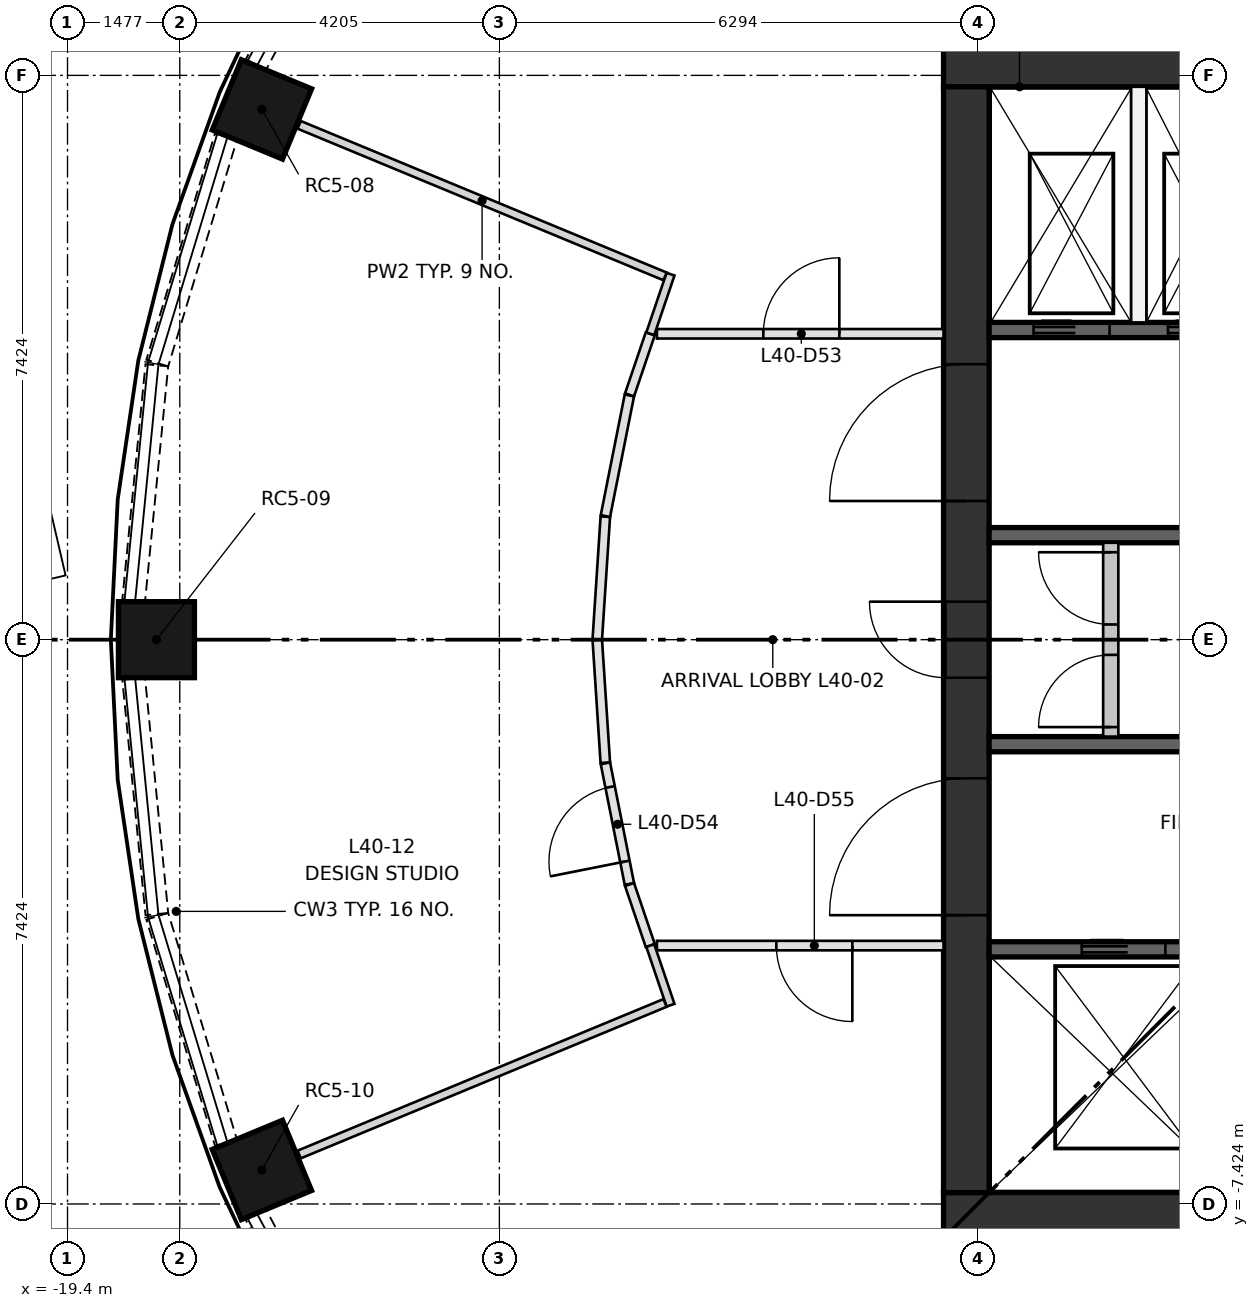
"""IFC4 building model, lengths in metres.
Left out: names, types, materials, properties, quantities, classifications, styles, units other than length and angle.
Written with IfcOpenShell. Run it as: python <this file> out.ifc"""

import sys

from ifc_helpers import new_model, si_unit, direction, frame, frame_2d, origin, origin_2d, place, context, subcontext, project, spatial, rectangle, extrude, element, fill, save


model = new_model("IFC4")
c1 = context("Model", 3, precision=1e-05, world=origin(), true_north=direction((0.0, 1.0)))
c2 = subcontext(c1, "Body", "Model", "MODEL_VIEW")
j1 = project(units=[si_unit("LENGTHUNIT", "METRE"), si_unit("PLANEANGLEUNIT", "RADIAN")], contexts=[c1])
p1 = place(None, origin())
s1 = spatial("IfcSite", under=j1, at=p1, CompositionType="ELEMENT")
p2 = place(p1, origin())
s2 = spatial("IfcBuilding", under=s1, at=p2, CompositionType="ELEMENT")
p3 = place(p2, frame((0.0, 0.0, 151.1)))
s3 = spatial("IfcBuildingStorey", under=s2, at=p3, CompositionType="ELEMENT", Elevation=151.1)
for number, where, z_axis, x_axis in (
    (1, (-16.842, 6.976, 0.0), (0.0, 0.0, 1.0), (-0.924, 0.383, 0.0)),
    (2, (-18.23, 0.0, 0.0), (0.0, 0.0, 1.0), (-1.0, 0.0, 0.0)),
    (3, (-16.842, -6.976, 0.0), (0.0, 0.0, 1.0), (-0.924, -0.383, 0.0)),
):
    element("IfcColumn", number, at=place(p3, frame(where, z_axis=z_axis, x_axis=x_axis)), inside=s3, PredefinedType="COLUMN", context=c2, shape_type="SweptSolid", body=[
        extrude(rectangle(XDim=1.0, YDim=1.0, at=origin_2d()), origin(), (0.0, 0.0, 1.0), 3.35),
    ])
for number, where, z_axis, x_axis in (
    (4, (-7.874, -7.574, 0.0), (0.0, 0.0, 1.0), (1.0, 0.0, 0.0)),
    (5, (-7.874, 7.574, 0.0), (0.0, 0.0, 1.0), (1.0, 0.0, 0.0)),
):
    element("IfcWall", number, at=place(p3, frame(where, z_axis=z_axis, x_axis=x_axis)), inside=s3, PredefinedType="SHEAR", context=c2, shape_type="SweptSolid", body=[
        extrude(rectangle(XDim=15.748, YDim=0.6, at=frame_2d((7.874, 0.0))), origin(), (0.0, 0.0, 1.0), 3.35),
    ])
p4 = place(p3, frame((-7.574, -7.274, 0.0), z_axis=(0.0, 0.0, 1.0), x_axis=(0.0, 1.0, 0.0)))
e6 = element("IfcWall", 6, at=p4, inside=s3, PredefinedType="SHEAR", context=c2, shape_type="SweptSolid", body=[
    extrude(rectangle(XDim=14.548, YDim=0.6, at=frame_2d((7.274, 0.0))), origin(), (0.0, 0.0, 1.0), 3.35),
])
p5 = place(p4, frame((6.774, 0.0, 0.0)))
e7 = element("IfcOpeningElement", 7, at=p5, cuts=e6, PredefinedType="OPENING", context=c2, shape_type="SweptSolid", body=[
    extrude(rectangle(XDim=1.0, YDim=2.1, at=frame_2d((0.5, 1.05))), frame((0.0, 0.31, 0.0), z_axis=(0.0, -1.0, 0.0), x_axis=(1.0, 0.0, 0.0)), (0.0, 0.0, 1.0), 0.62),
])
p6 = place(p4, frame((3.649, 0.0, 0.0)))
e8 = element("IfcOpeningElement", 8, at=p6, cuts=e6, PredefinedType="OPENING", context=c2, shape_type="SweptSolid", body=[
    extrude(rectangle(XDim=1.8, YDim=2.1, at=frame_2d((0.9, 1.05))), frame((0.0, 0.31, 0.0), z_axis=(0.0, -1.0, 0.0), x_axis=(1.0, 0.0, 0.0)), (0.0, 0.0, 1.0), 0.62),
])
p7 = place(p4, frame((9.098, 0.0, 0.0)))
e9 = element("IfcOpeningElement", 9, at=p7, cuts=e6, PredefinedType="OPENING", context=c2, shape_type="SweptSolid", body=[
    extrude(rectangle(XDim=1.8, YDim=2.1, at=frame_2d((0.9, 1.05))), frame((0.0, 0.31, 0.0), z_axis=(0.0, -1.0, 0.0), x_axis=(1.0, 0.0, 0.0)), (0.0, 0.0, 1.0), 0.62),
])
p8 = place(p3, frame((-7.274, -4.074, 0.0), z_axis=(0.0, 0.0, 1.0), x_axis=(1.0, 0.0, 0.0)))
e10 = element("IfcWall", 10, at=p8, inside=s3, PredefinedType="SHEAR", context=c2, shape_type="SweptSolid", body=[
    extrude(rectangle(XDim=14.548, YDim=0.2, at=frame_2d((7.274, 0.0))), origin(), (0.0, 0.0, 1.0), 3.0),
])
p9 = place(p8, frame((1.219, 0.0, 0.0)))
e11 = element("IfcOpeningElement", 11, at=p9, cuts=e10, PredefinedType="OPENING", context=c2, shape_type="SweptSolid", body=[
    extrude(rectangle(XDim=1.1, YDim=2.1, at=frame_2d((0.55, 1.05))), frame((0.0, 0.11, 0.0), z_axis=(0.0, -1.0, 0.0), x_axis=(1.0, 0.0, 0.0)), (0.0, 0.0, 1.0), 0.22),
])
p10 = place(p8, frame((4.355, 0.0, 0.0)))
e12 = element("IfcOpeningElement", 12, at=p10, cuts=e10, PredefinedType="OPENING", context=c2, shape_type="SweptSolid", body=[
    extrude(rectangle(XDim=1.1, YDim=2.1, at=frame_2d((0.55, 1.05))), frame((0.0, 0.11, 0.0), z_axis=(0.0, -1.0, 0.0), x_axis=(1.0, 0.0, 0.0)), (0.0, 0.0, 1.0), 0.22),
])
p11 = place(p8, frame((7.047, 0.0, 0.0)))
e13 = element("IfcOpeningElement", 13, at=p11, cuts=e10, PredefinedType="OPENING", context=c2, shape_type="SweptSolid", body=[
    extrude(rectangle(XDim=0.8, YDim=2.1, at=frame_2d((0.4, 1.05))), frame((0.0, 0.11, 0.0), z_axis=(0.0, -1.0, 0.0), x_axis=(1.0, 0.0, 0.0)), (0.0, 0.0, 1.0), 0.22),
])
p12 = place(p8, frame((9.185, 0.0, 0.0)))
e14 = element("IfcOpeningElement", 14, at=p12, cuts=e10, PredefinedType="OPENING", context=c2, shape_type="SweptSolid", body=[
    extrude(rectangle(XDim=1.0, YDim=2.1, at=frame_2d((0.5, 1.05))), frame((0.0, 0.11, 0.0), z_axis=(0.0, -1.0, 0.0), x_axis=(1.0, 0.0, 0.0)), (0.0, 0.0, 1.0), 0.22),
])
p13 = place(p8, frame((11.228, 0.0, 0.0)))
e15 = element("IfcOpeningElement", 15, at=p13, cuts=e10, PredefinedType="OPENING", context=c2, shape_type="SweptSolid", body=[
    extrude(rectangle(XDim=1.0, YDim=2.1, at=frame_2d((0.5, 1.05))), frame((0.0, 0.11, 0.0), z_axis=(0.0, -1.0, 0.0), x_axis=(1.0, 0.0, 0.0)), (0.0, 0.0, 1.0), 0.22),
])
p14 = place(p8, frame((13.078, 0.0, 0.0)))
e16 = element("IfcOpeningElement", 16, at=p14, cuts=e10, PredefinedType="OPENING", context=c2, shape_type="SweptSolid", body=[
    extrude(rectangle(XDim=1.0, YDim=2.1, at=frame_2d((0.5, 1.05))), frame((0.0, 0.11, 0.0), z_axis=(0.0, -1.0, 0.0), x_axis=(1.0, 0.0, 0.0)), (0.0, 0.0, 1.0), 0.22),
])
p15 = place(p3, frame((-7.274, 4.074, 0.0), z_axis=(0.0, 0.0, 1.0), x_axis=(1.0, 0.0, 0.0)))
e17 = element("IfcWall", 17, at=p15, inside=s3, PredefinedType="SHEAR", context=c2, shape_type="SweptSolid", body=[
    extrude(rectangle(XDim=7.274, YDim=0.2, at=frame_2d((3.637, 0.0))), origin(), (0.0, 0.0, 1.0), 3.0),
])
p16 = place(p15, frame((0.584, 0.0, 0.0)))
e18 = element("IfcOpeningElement", 18, at=p16, cuts=e17, PredefinedType="OPENING", context=c2, shape_type="SweptSolid", body=[
    extrude(rectangle(XDim=1.0, YDim=2.1, at=frame_2d((0.5, 1.05))), frame((0.0, 0.11, 0.0), z_axis=(0.0, -1.0, 0.0), x_axis=(1.0, 0.0, 0.0)), (0.0, 0.0, 1.0), 0.22),
])
p17 = place(p15, frame((2.353, 0.0, 0.0)))
e19 = element("IfcOpeningElement", 19, at=p17, cuts=e17, PredefinedType="OPENING", context=c2, shape_type="SweptSolid", body=[
    extrude(rectangle(XDim=1.0, YDim=2.1, at=frame_2d((0.5, 1.05))), frame((0.0, 0.11, 0.0), z_axis=(0.0, -1.0, 0.0), x_axis=(1.0, 0.0, 0.0)), (0.0, 0.0, 1.0), 0.22),
])
p18 = place(p15, frame((4.121, 0.0, 0.0)))
e20 = element("IfcOpeningElement", 20, at=p18, cuts=e17, PredefinedType="OPENING", context=c2, shape_type="SweptSolid", body=[
    extrude(rectangle(XDim=1.0, YDim=2.1, at=frame_2d((0.5, 1.05))), frame((0.0, 0.11, 0.0), z_axis=(0.0, -1.0, 0.0), x_axis=(1.0, 0.0, 0.0)), (0.0, 0.0, 1.0), 0.22),
])
p19 = place(p15, frame((5.89, 0.0, 0.0)))
e21 = element("IfcOpeningElement", 21, at=p19, cuts=e17, PredefinedType="OPENING", context=c2, shape_type="SweptSolid", body=[
    extrude(rectangle(XDim=1.0, YDim=2.1, at=frame_2d((0.5, 1.05))), frame((0.0, 0.11, 0.0), z_axis=(0.0, -1.0, 0.0), x_axis=(1.0, 0.0, 0.0)), (0.0, 0.0, 1.0), 0.22),
])
for number, where, z_axis, x_axis in (
    (22, (-7.274, -1.375, 0.0), (0.0, 0.0, 1.0), (1.0, 0.0, 0.0)),
    (23, (-7.274, 1.375, 0.0), (0.0, 0.0, 1.0), (1.0, 0.0, 0.0)),
):
    element("IfcWall", number, at=place(p3, frame(where, z_axis=z_axis, x_axis=x_axis)), inside=s3, PredefinedType="SHEAR", context=c2, shape_type="SweptSolid", body=[
        extrude(rectangle(XDim=2.9, YDim=0.2, at=frame_2d((1.45, 0.0))), origin(), (0.0, 0.0, 1.0), 3.0),
    ])
p20 = place(p3, frame((-5.305, 4.174, 0.0), z_axis=(0.0, 0.0, 1.0), x_axis=(0.0, 1.0, 0.0)))
e24 = element("IfcWall", 24, at=p20, inside=s3, PredefinedType="PARTITIONING", context=c2, shape_type="SweptSolid", body=[
    extrude(rectangle(XDim=3.1, YDim=0.2, at=frame_2d((1.55, 0.0))), origin(), (0.0, 0.0, 1.0), 3.0),
])
p21 = place(p3, frame((-5.674, -1.275, 0.0), z_axis=(0.0, 0.0, 1.0), x_axis=(0.0, 1.0, 0.0)))
e25 = element("IfcWall", 25, at=p21, inside=s3, PredefinedType="PARTITIONING", context=c2, shape_type="SweptSolid", body=[
    extrude(rectangle(XDim=2.55, YDim=0.2, at=frame_2d((1.275, 0.0))), origin(), (0.0, 0.0, 1.0), 3.0),
])
p22 = place(p21, frame((0.125, 0.0, 0.0)))
e26 = element("IfcOpeningElement", 26, at=p22, cuts=e25, PredefinedType="OPENING", context=c2, shape_type="SweptSolid", body=[
    extrude(rectangle(XDim=0.95, YDim=2.1, at=frame_2d((0.475, 1.05))), frame((0.0, 0.11, 0.0), z_axis=(0.0, -1.0, 0.0), x_axis=(1.0, 0.0, 0.0)), (0.0, 0.0, 1.0), 0.22),
])
p23 = place(p21, frame((1.475, 0.0, 0.0)))
e27 = element("IfcOpeningElement", 27, at=p23, cuts=e25, PredefinedType="OPENING", context=c2, shape_type="SweptSolid", body=[
    extrude(rectangle(XDim=0.95, YDim=2.1, at=frame_2d((0.475, 1.05))), frame((0.0, 0.11, 0.0), z_axis=(0.0, -1.0, 0.0), x_axis=(1.0, 0.0, 0.0)), (0.0, 0.0, 1.0), 0.22),
])
p24 = place(p3, frame((-15.455, 10.309, 0.0), z_axis=(0.0, 0.0, 1.0), x_axis=(-0.471467771589, -0.881883291798, 0.0)))
e28 = element("IfcWall", 28, at=p24, inside=s3, PredefinedType="SOLIDWALL", context=c2, shape_type="SweptSolid", body=[
    extrude(rectangle(XDim=3.111, YDim=0.3, at=frame_2d((1.556, 0.0))), origin(), (0.0, 0.0, 1.0), 0.9),
])
p25 = place(p3, frame((-17.315, 6.617, 0.0), z_axis=(0.0, 0.0, 1.0), x_axis=(-0.29026219948, -0.956947154002, 0.0)))
e29 = element("IfcWall", 29, at=p25, inside=s3, PredefinedType="SOLIDWALL", context=c2, shape_type="SweptSolid", body=[
    extrude(rectangle(XDim=3.111, YDim=0.3, at=frame_2d((1.556, 0.0))), origin(), (0.0, 0.0, 1.0), 0.9),
])
for number, where, z_axis, x_axis in (
    (30, (-18.225, 3.61, 0.0), (0.0, 0.0, 1.0), (-0.098, -0.995, 0.0)),
    (31, (-18.53, -0.514, 0.0), (0.0, 0.0, 1.0), (0.098, -0.995, 0.0)),
):
    element("IfcWall", number, at=place(p3, frame(where, z_axis=z_axis, x_axis=x_axis)), inside=s3, PredefinedType="SOLIDWALL", context=c2, shape_type="SweptSolid", body=[
        extrude(rectangle(XDim=3.111, YDim=0.3, at=frame_2d((1.556, 0.0))), origin(), (0.0, 0.0, 1.0), 0.9),
    ])
p26 = place(p3, frame((-18.219, -3.639, 0.0), z_axis=(0.0, 0.0, 1.0), x_axis=(0.29026219948, -0.956947154002, 0.0)))
e32 = element("IfcWall", 32, at=p26, inside=s3, PredefinedType="SOLIDWALL", context=c2, shape_type="SweptSolid", body=[
    extrude(rectangle(XDim=3.111, YDim=0.3, at=frame_2d((1.556, 0.0))), origin(), (0.0, 0.0, 1.0), 0.9),
])
p27 = place(p3, frame((-16.922, -7.565, 0.0), z_axis=(0.0, 0.0, 1.0), x_axis=(0.471467771589, -0.881883291798, 0.0)))
e33 = element("IfcWall", 33, at=p27, inside=s3, PredefinedType="SOLIDWALL", context=c2, shape_type="SweptSolid", body=[
    extrude(rectangle(XDim=3.111, YDim=0.3, at=frame_2d((1.556, 0.0))), origin(), (0.0, 0.0, 1.0), 0.9),
])
p28 = place(p3, frame((-11.645, 4.024, 0.0), z_axis=(0.0, 0.0, 1.0), x_axis=(1.0, 0.0, 0.0)))
e34 = element("IfcWall", 34, at=p28, inside=s3, PredefinedType="PARTITIONING", context=c2, shape_type="SweptSolid", body=[
    extrude(rectangle(XDim=3.771, YDim=0.125, at=frame_2d((1.886, 0.0))), origin(), (0.0, 0.0, 1.0), 3.0),
])
p29 = place(p28, frame((1.4, 0.0, 0.0)))
e35 = element("IfcOpeningElement", 35, at=p29, cuts=e34, PredefinedType="OPENING", context=c2, shape_type="SweptSolid", body=[
    extrude(rectangle(XDim=1.0, YDim=2.1, at=frame_2d((0.5, 1.05))), frame((0.0, 0.073, 0.0), z_axis=(0.0, -1.0, 0.0), x_axis=(1.0, 0.0, 0.0)), (0.0, 0.0, 1.0), 0.145),
])
for number, where, z_axis, x_axis in (
    (36, (-12.43, 0.004, 0.0), (0.0, 0.0, 1.0), (0.065, 0.998, 0.0)),
    (37, (-12.324, -1.618, 0.0), (0.0, 0.0, 1.0), (-0.065, 0.998, 0.0)),
    (38, (-12.323, 1.626, 0.0), (0.0, 0.0, 1.0), (0.195, 0.981, 0.0)),
):
    element("IfcWall", number, at=place(p3, frame(where, z_axis=z_axis, x_axis=x_axis)), inside=s3, PredefinedType="PARTITIONING", context=c2, shape_type="SweptSolid", body=[
        extrude(rectangle(XDim=1.618, YDim=0.125, at=frame_2d((0.809, 0.0))), origin(), (0.0, 0.0, 1.0), 3.0),
    ])
p30 = place(p3, frame((-12.007, -3.213, 0.0), z_axis=(0.0, 0.0, 1.0), x_axis=(-0.195129303098, 0.980777525779, 0.0)))
e39 = element("IfcWall", 39, at=p30, inside=s3, PredefinedType="PARTITIONING", context=c2, shape_type="SweptSolid", body=[
    extrude(rectangle(XDim=1.618, YDim=0.125, at=frame_2d((0.809, 0.0))), origin(), (0.0, 0.0, 1.0), 3.0),
])
p31 = place(p30, frame((0.3, 0.0, 0.0)))
e40 = element("IfcOpeningElement", 40, at=p31, cuts=e39, PredefinedType="OPENING", context=c2, shape_type="SweptSolid", body=[
    extrude(rectangle(XDim=1.0, YDim=2.1, at=frame_2d((0.5, 1.05))), frame((0.0, 0.073, 0.0), z_axis=(0.0, -1.0, 0.0), x_axis=(1.0, 0.0, 0.0)), (0.0, 0.0, 1.0), 0.145),
])
for number, where, z_axis, x_axis in (
    (41, (-12.005, 3.221, 0.0), (0.0, 0.0, 1.0), (0.321, 0.947, 0.0)),
    (42, (-11.732, -4.024, 0.0), (0.0, 0.0, 1.0), (-0.321, 0.947, 0.0)),
):
    element("IfcWall", number, at=place(p3, frame(where, z_axis=z_axis, x_axis=x_axis)), inside=s3, PredefinedType="PARTITIONING", context=c2, shape_type="SweptSolid", body=[
        extrude(rectangle(XDim=0.848, YDim=0.125, at=frame_2d((0.424, 0.0))), origin(), (0.0, 0.0, 1.0), 3.0),
    ])
p32 = place(p3, frame((-7.874, -4.024, 0.0), z_axis=(0.0, 0.0, 1.0), x_axis=(-1.0, 0.0, 0.0)))
e43 = element("IfcWall", 43, at=p32, inside=s3, PredefinedType="PARTITIONING", context=c2, shape_type="SweptSolid", body=[
    extrude(rectangle(XDim=3.771, YDim=0.125, at=frame_2d((1.886, 0.0))), origin(), (0.0, 0.0, 1.0), 3.0),
])
p33 = place(p32, frame((1.2, 0.0, 0.0)))
e44 = element("IfcOpeningElement", 44, at=p33, cuts=e43, PredefinedType="OPENING", context=c2, shape_type="SweptSolid", body=[
    extrude(rectangle(XDim=1.0, YDim=2.1, at=frame_2d((0.5, 1.05))), frame((0.0, 0.073, 0.0), z_axis=(0.0, -1.0, 0.0), x_axis=(1.0, 0.0, 0.0)), (0.0, 0.0, 1.0), 0.145),
])
p34 = place(p3, frame((-11.732, 4.024, 0.0), z_axis=(0.0, 0.0, 1.0), x_axis=(0.321527585288, 0.946900212218, 0.0)))
e45 = element("IfcWall", 45, at=p34, inside=s3, PredefinedType="PARTITIONING", context=c2, shape_type="SweptSolid", body=[
    extrude(rectangle(XDim=0.828, YDim=0.11, at=frame_2d((0.414, 0.0))), origin(), (0.0, 0.0, 1.0), 3.0),
])
p35 = place(p3, frame((-11.538, 4.779, 0.0), z_axis=(0.0, 0.0, 1.0), x_axis=(-0.923891220199, 0.382655214572, 0.0)))
e46 = element("IfcWall", 46, at=p35, inside=s3, PredefinedType="PARTITIONING", context=c2, shape_type="SweptSolid", body=[
    extrude(rectangle(XDim=5.211, YDim=0.11, at=frame_2d((2.606, 0.0))), origin(), (0.0, 0.0, 1.0), 3.0),
])
p36 = place(p3, frame((-11.732, -4.024, 0.0), z_axis=(0.0, 0.0, 1.0), x_axis=(0.321527585288, -0.946900212218, 0.0)))
e47 = element("IfcWall", 47, at=p36, inside=s3, PredefinedType="PARTITIONING", context=c2, shape_type="SweptSolid", body=[
    extrude(rectangle(XDim=0.828, YDim=0.11, at=frame_2d((0.414, 0.0))), origin(), (0.0, 0.0, 1.0), 3.0),
])
p37 = place(p3, frame((-11.538, -4.779, 0.0), z_axis=(0.0, 0.0, 1.0), x_axis=(-0.923891220199, -0.382655214572, 0.0)))
e48 = element("IfcWall", 48, at=p37, inside=s3, PredefinedType="PARTITIONING", context=c2, shape_type="SweptSolid", body=[
    extrude(rectangle(XDim=5.211, YDim=0.11, at=frame_2d((2.606, 0.0))), origin(), (0.0, 0.0, 1.0), 3.0),
])
p38 = place(p9, origin())
e49 = element("IfcDoor", 49, at=p38, inside=s3, OperationType="DOUBLE_DOOR_SLIDING", PredefinedType="DOOR", context=c2, shape_type="SweptSolid", body=[
    extrude(rectangle(XDim=1.1, YDim=2.1, at=frame_2d((0.55, 1.05))), frame((0.0, 0.025, 0.0), z_axis=(0.0, -1.0, 0.0), x_axis=(1.0, 0.0, 0.0)), (0.0, 0.0, 1.0), 0.05),
])
fill(e11, e49)
p39 = place(p16, frame((1.0, 0.0, 0.0), z_axis=(0.0, 0.0, 1.0), x_axis=(-1.0, 0.0, 0.0)))
e50 = element("IfcDoor", 50, at=p39, inside=s3, OperationType="DOUBLE_DOOR_SLIDING", PredefinedType="DOOR", context=c2, shape_type="SweptSolid", body=[
    extrude(rectangle(XDim=1.0, YDim=2.1, at=frame_2d((0.5, 1.05))), frame((0.0, 0.025, 0.0), z_axis=(0.0, -1.0, 0.0), x_axis=(1.0, 0.0, 0.0)), (0.0, 0.0, 1.0), 0.05),
])
fill(e18, e50)
p40 = place(p17, frame((1.0, 0.0, 0.0), z_axis=(0.0, 0.0, 1.0), x_axis=(-1.0, 0.0, 0.0)))
e51 = element("IfcDoor", 51, at=p40, inside=s3, OperationType="DOUBLE_DOOR_SLIDING", PredefinedType="DOOR", context=c2, shape_type="SweptSolid", body=[
    extrude(rectangle(XDim=1.0, YDim=2.1, at=frame_2d((0.5, 1.05))), frame((0.0, 0.025, 0.0), z_axis=(0.0, -1.0, 0.0), x_axis=(1.0, 0.0, 0.0)), (0.0, 0.0, 1.0), 0.05),
])
fill(e19, e51)
p41 = place(p22, origin())
e52 = element("IfcDoor", 52, at=p41, inside=s3, OperationType="SINGLE_SWING_LEFT", PredefinedType="DOOR", context=c2, shape_type="SweptSolid", body=[
    extrude(rectangle(XDim=0.95, YDim=2.1, at=frame_2d((0.475, 1.05))), frame((0.0, 0.025, 0.0), z_axis=(0.0, -1.0, 0.0), x_axis=(1.0, 0.0, 0.0)), (0.0, 0.0, 1.0), 0.05),
])
fill(e26, e52)
p42 = place(p23, origin())
e53 = element("IfcDoor", 53, at=p42, inside=s3, OperationType="SINGLE_SWING_RIGHT", PredefinedType="DOOR", context=c2, shape_type="SweptSolid", body=[
    extrude(rectangle(XDim=0.95, YDim=2.1, at=frame_2d((0.475, 1.05))), frame((0.0, 0.025, 0.0), z_axis=(0.0, -1.0, 0.0), x_axis=(1.0, 0.0, 0.0)), (0.0, 0.0, 1.0), 0.05),
])
fill(e27, e53)
p43 = place(p5, origin())
e54 = element("IfcDoor", 54, at=p43, inside=s3, OperationType="SINGLE_SWING_RIGHT", PredefinedType="DOOR", context=c2, shape_type="SweptSolid", body=[
    extrude(rectangle(XDim=1.0, YDim=2.1, at=frame_2d((0.5, 1.05))), frame((0.0, 0.3, 0.0), z_axis=(0.0, -1.0, 0.0), x_axis=(1.0, 0.0, 0.0)), (0.0, 0.0, 1.0), 0.05),
])
fill(e7, e54)
p44 = place(p6, origin())
e55 = element("IfcDoor", 55, at=p44, inside=s3, OperationType="DOUBLE_DOOR_SINGLE_SWING", PredefinedType="DOOR", context=c2, shape_type="SweptSolid", body=[
    extrude(rectangle(XDim=1.8, YDim=2.1, at=frame_2d((0.9, 1.05))), frame((0.0, 0.025, 0.0), z_axis=(0.0, -1.0, 0.0), x_axis=(1.0, 0.0, 0.0)), (0.0, 0.0, 1.0), 0.05),
])
fill(e8, e55)
p45 = place(p7, origin())
e56 = element("IfcDoor", 56, at=p45, inside=s3, OperationType="DOUBLE_DOOR_SINGLE_SWING", PredefinedType="DOOR", context=c2, shape_type="SweptSolid", body=[
    extrude(rectangle(XDim=1.8, YDim=2.1, at=frame_2d((0.9, 1.05))), frame((0.0, 0.025, 0.0), z_axis=(0.0, -1.0, 0.0), x_axis=(1.0, 0.0, 0.0)), (0.0, 0.0, 1.0), 0.05),
])
fill(e9, e56)
p46 = place(p29, origin())
e57 = element("IfcDoor", 57, at=p46, inside=s3, OperationType="SINGLE_SWING_RIGHT", PredefinedType="DOOR", context=c2, shape_type="SweptSolid", body=[
    extrude(rectangle(XDim=1.0, YDim=2.1, at=frame_2d((0.5, 1.05))), frame((0.0, 0.025, 0.0), z_axis=(0.0, -1.0, 0.0), x_axis=(1.0, 0.0, 0.0)), (0.0, 0.0, 1.0), 0.05),
])
fill(e35, e57)
p47 = place(p31, origin())
e58 = element("IfcDoor", 58, at=p47, inside=s3, OperationType="SINGLE_SWING_LEFT", PredefinedType="DOOR", context=c2, shape_type="SweptSolid", body=[
    extrude(rectangle(XDim=1.0, YDim=2.1, at=frame_2d((0.5, 1.05))), frame((0.0, 0.025, 0.0), z_axis=(0.0, -1.0, 0.0), x_axis=(1.0, 0.0, 0.0)), (0.0, 0.0, 1.0), 0.05),
])
fill(e40, e58)
p48 = place(p33, origin())
e59 = element("IfcDoor", 59, at=p48, inside=s3, OperationType="SINGLE_SWING_LEFT", PredefinedType="DOOR", context=c2, shape_type="SweptSolid", body=[
    extrude(rectangle(XDim=1.0, YDim=2.1, at=frame_2d((0.5, 1.05))), frame((0.0, 0.025, 0.0), z_axis=(0.0, -1.0, 0.0), x_axis=(1.0, 0.0, 0.0)), (0.0, 0.0, 1.0), 0.05),
])
fill(e44, e59)
save(model, sys.argv[1])
